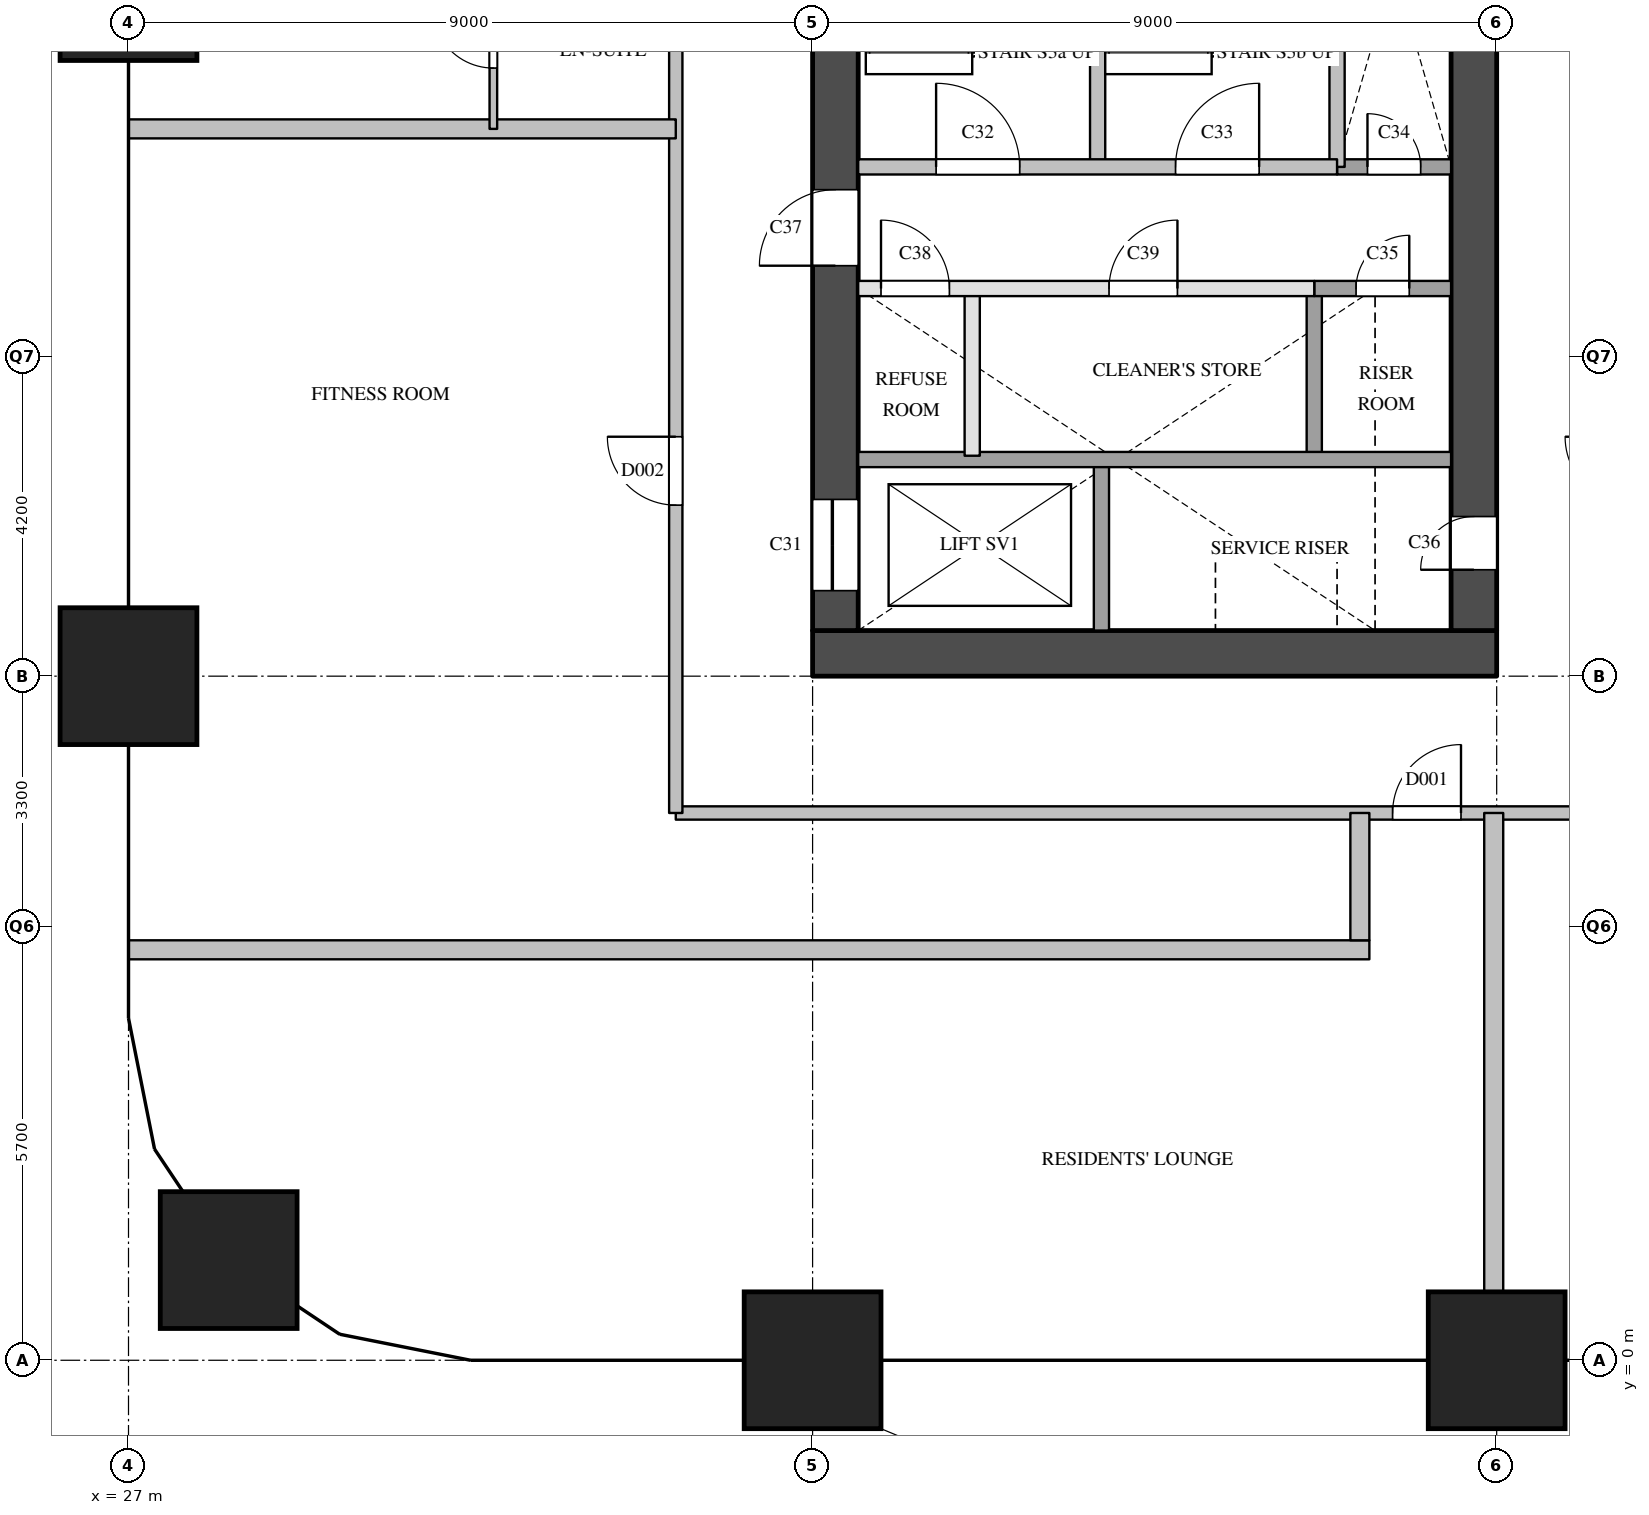
"""IFC4 building model, lengths in metres.
Left out: names, types, materials, properties, quantities, classifications, styles, units other than length and angle.
Written with IfcOpenShell. Run it as: python <this file> out.ifc"""

import sys

from ifc_helpers import new_model, si_unit, direction, frame, frame_2d, origin, origin_2d, place, context, subcontext, project, spatial, rectangle, extrude, element, fill, save


model = new_model("IFC4")
c1 = context("Model", 3, precision=1e-05, world=origin(), true_north=direction((0.0, 1.0)))
c2 = subcontext(c1, "Body", "Model", "MODEL_VIEW")
j1 = project(units=[si_unit("LENGTHUNIT", "METRE"), si_unit("PLANEANGLEUNIT", "RADIAN")], contexts=[c1])
p1 = place(None, origin())
s1 = spatial("IfcSite", under=j1, at=p1, CompositionType="ELEMENT")
p2 = place(p1, origin())
s2 = spatial("IfcBuilding", under=s1, at=p2, CompositionType="ELEMENT")
p3 = place(p2, frame((0.0, 0.0, 89.2)))
s3 = spatial("IfcBuildingStorey", under=s2, at=p3, CompositionType="ELEMENT", Elevation=89.2)
for number, where, z_axis, x_axis in (
    (1, (28.318, 1.318, 0.0), (0.0, 0.0, 1.0), (1.0, 0.0, 0.0)),
    (2, (27.0, 9.0, 0.0), (0.0, 0.0, 1.0), (1.0, 0.0, 0.0)),
    (3, (27.0, 18.0, 0.0), (0.0, 0.0, 1.0), (1.0, 0.0, 0.0)),
    (4, (36.0, 0.0, 0.0), (0.0, 0.0, 1.0), (1.0, 0.0, 0.0)),
    (5, (45.0, 0.0, 0.0), (0.0, 0.0, 1.0), (1.0, 0.0, 0.0)),
):
    element("IfcColumn", number, at=place(p3, frame(where, z_axis=z_axis, x_axis=x_axis)), inside=s3, PredefinedType="COLUMN", context=c2, shape_type="SweptSolid", body=[
        extrude(rectangle(XDim=1.8, YDim=1.8, at=origin_2d()), origin(), (0.0, 0.0, 1.0), 3.8),
    ])
p4 = place(p3, frame((36.0, 9.3, 0.0), z_axis=(0.0, 0.0, 1.0), x_axis=(1.0, 0.0, 0.0)))
e6 = element("IfcWall", 6, at=p4, inside=s3, PredefinedType="SHEAR", context=c2, shape_type="SweptSolid", body=[
    extrude(rectangle(XDim=9.0, YDim=0.6, at=frame_2d((4.5, 0.0))), origin(), (0.0, 0.0, 1.0), 3.5),
])
p5 = place(p3, frame((36.3, 9.6, 0.0), z_axis=(0.0, 0.0, 1.0), x_axis=(0.0, 1.0, 0.0)))
e7 = element("IfcWall", 7, at=p5, inside=s3, PredefinedType="SHEAR", context=c2, shape_type="SweptSolid", body=[
    extrude(rectangle(XDim=12.3, YDim=0.6, at=frame_2d((6.15, 0.0))), origin(), (0.0, 0.0, 1.0), 3.5),
])
p6 = place(p5, frame((0.525, 0.0, 0.0)))
e8 = element("IfcOpeningElement", 8, at=p6, cuts=e7, PredefinedType="OPENING", context=c2, shape_type="SweptSolid", body=[
    extrude(rectangle(XDim=1.2, YDim=2.1, at=frame_2d((0.6, 1.05))), frame((0.0, 0.31, 0.0), z_axis=(0.0, -1.0, 0.0), x_axis=(1.0, 0.0, 0.0)), (0.0, 0.0, 1.0), 0.62),
])
p7 = place(p5, frame((4.8, 0.0, 0.0)))
e9 = element("IfcOpeningElement", 9, at=p7, cuts=e7, PredefinedType="OPENING", context=c2, shape_type="SweptSolid", body=[
    extrude(rectangle(XDim=1.0, YDim=2.1, at=frame_2d((0.5, 1.05))), frame((0.0, 0.31, 0.0), z_axis=(0.0, -1.0, 0.0), x_axis=(1.0, 0.0, 0.0)), (0.0, 0.0, 1.0), 0.62),
])
p8 = place(p3, frame((44.7, 9.6, 0.0), z_axis=(0.0, 0.0, 1.0), x_axis=(0.0, 1.0, 0.0)))
e10 = element("IfcWall", 10, at=p8, inside=s3, PredefinedType="SHEAR", context=c2, shape_type="SweptSolid", body=[
    extrude(rectangle(XDim=12.3, YDim=0.6, at=frame_2d((6.15, 0.0))), origin(), (0.0, 0.0, 1.0), 3.5),
])
p9 = place(p8, frame((0.8, 0.0, 0.0)))
e11 = element("IfcOpeningElement", 11, at=p9, cuts=e10, PredefinedType="OPENING", context=c2, shape_type="SweptSolid", body=[
    extrude(rectangle(XDim=0.7, YDim=2.1, at=frame_2d((0.35, 1.05))), frame((0.0, 0.31, 0.0), z_axis=(0.0, -1.0, 0.0), x_axis=(1.0, 0.0, 0.0)), (0.0, 0.0, 1.0), 0.62),
])
p10 = place(p3, frame((38.1, 11.9, 0.0), z_axis=(0.0, 0.0, 1.0), x_axis=(0.0, 1.0, 0.0)))
e12 = element("IfcWall", 12, at=p10, inside=s3, PredefinedType="PARTITIONING", context=c2, shape_type="SweptSolid", body=[
    extrude(rectangle(XDim=2.2, YDim=0.2, at=frame_2d((1.1, 0.0))), origin(), (0.0, 0.0, 1.0), 3.5),
])
p11 = place(p3, frame((39.75, 15.7, 0.0), z_axis=(0.0, 0.0, 1.0), x_axis=(0.0, 1.0, 0.0)))
e13 = element("IfcWall", 13, at=p11, inside=s3, PredefinedType="SOLIDWALL", context=c2, shape_type="SweptSolid", body=[
    extrude(rectangle(XDim=4.3, YDim=0.2, at=frame_2d((2.15, 0.0))), origin(), (0.0, 0.0, 1.0), 3.5),
])
p12 = place(p3, frame((39.8, 9.6, 0.0), z_axis=(0.0, 0.0, 1.0), x_axis=(0.0, 1.0, 0.0)))
e14 = element("IfcWall", 14, at=p12, inside=s3, PredefinedType="SOLIDWALL", context=c2, shape_type="SweptSolid", body=[
    extrude(rectangle(XDim=2.3, YDim=0.2, at=frame_2d((1.15, 0.0))), origin(), (0.0, 0.0, 1.0), 3.5),
])
p13 = place(p3, frame((42.6, 11.9, 0.0), z_axis=(0.0, 0.0, 1.0), x_axis=(0.0, 1.0, 0.0)))
e15 = element("IfcWall", 15, at=p13, inside=s3, PredefinedType="SOLIDWALL", context=c2, shape_type="SweptSolid", body=[
    extrude(rectangle(XDim=2.2, YDim=0.2, at=frame_2d((1.1, 0.0))), origin(), (0.0, 0.0, 1.0), 3.5),
])
p14 = place(p3, frame((42.9, 15.7, 0.0), z_axis=(0.0, 0.0, 1.0), x_axis=(0.0, 1.0, 0.0)))
e16 = element("IfcWall", 16, at=p14, inside=s3, PredefinedType="SOLIDWALL", context=c2, shape_type="SweptSolid", body=[
    extrude(rectangle(XDim=4.3, YDim=0.2, at=frame_2d((2.15, 0.0))), origin(), (0.0, 0.0, 1.0), 3.5),
])
p15 = place(p3, frame((36.6, 11.85, 0.0), z_axis=(0.0, 0.0, 1.0), x_axis=(1.0, 0.0, 0.0)))
e17 = element("IfcWall", 17, at=p15, inside=s3, PredefinedType="SOLIDWALL", context=c2, shape_type="SweptSolid", body=[
    extrude(rectangle(XDim=7.8, YDim=0.2, at=frame_2d((3.9, 0.0))), origin(), (0.0, 0.0, 1.0), 3.5),
])
p16 = place(p3, frame((36.6, 14.1, 0.0), z_axis=(0.0, 0.0, 1.0), x_axis=(1.0, 0.0, 0.0)))
e18 = element("IfcWall", 18, at=p16, inside=s3, PredefinedType="PARTITIONING", context=c2, shape_type="SweptSolid", body=[
    extrude(rectangle(XDim=6.0, YDim=0.2, at=frame_2d((3.0, 0.0))), origin(), (0.0, 0.0, 1.0), 3.5),
])
p17 = place(p16, frame((0.3, 0.0, 0.0)))
e19 = element("IfcOpeningElement", 19, at=p17, cuts=e18, PredefinedType="OPENING", context=c2, shape_type="SweptSolid", body=[
    extrude(rectangle(XDim=0.9, YDim=2.1, at=frame_2d((0.45, 1.05))), frame((0.0, 0.11, 0.0), z_axis=(0.0, -1.0, 0.0), x_axis=(1.0, 0.0, 0.0)), (0.0, 0.0, 1.0), 0.22),
])
p18 = place(p16, frame((3.3, 0.0, 0.0)))
e20 = element("IfcOpeningElement", 20, at=p18, cuts=e18, PredefinedType="OPENING", context=c2, shape_type="SweptSolid", body=[
    extrude(rectangle(XDim=0.9, YDim=2.1, at=frame_2d((0.45, 1.05))), frame((0.0, 0.11, 0.0), z_axis=(0.0, -1.0, 0.0), x_axis=(1.0, 0.0, 0.0)), (0.0, 0.0, 1.0), 0.22),
])
p19 = place(p3, frame((42.6, 14.1, 0.0), z_axis=(0.0, 0.0, 1.0), x_axis=(1.0, 0.0, 0.0)))
e21 = element("IfcWall", 21, at=p19, inside=s3, PredefinedType="SOLIDWALL", context=c2, shape_type="SweptSolid", body=[
    extrude(rectangle(XDim=1.8, YDim=0.2, at=frame_2d((0.9, 0.0))), origin(), (0.0, 0.0, 1.0), 3.5),
])
p20 = place(p19, frame((0.55, 0.0, 0.0)))
e22 = element("IfcOpeningElement", 22, at=p20, cuts=e21, PredefinedType="OPENING", context=c2, shape_type="SweptSolid", body=[
    extrude(rectangle(XDim=0.7, YDim=2.1, at=frame_2d((0.35, 1.05))), frame((0.0, 0.11, 0.0), z_axis=(0.0, -1.0, 0.0), x_axis=(1.0, 0.0, 0.0)), (0.0, 0.0, 1.0), 0.22),
])
p21 = place(p3, frame((42.9, 15.7, 0.0), z_axis=(0.0, 0.0, 1.0), x_axis=(1.0, 0.0, 0.0)))
e23 = element("IfcWall", 23, at=p21, inside=s3, PredefinedType="SOLIDWALL", context=c2, shape_type="SweptSolid", body=[
    extrude(rectangle(XDim=1.5, YDim=0.2, at=frame_2d((0.75, 0.0))), origin(), (0.0, 0.0, 1.0), 3.5),
])
p22 = place(p21, frame((0.4, 0.0, 0.0)))
e24 = element("IfcOpeningElement", 24, at=p22, cuts=e23, PredefinedType="OPENING", context=c2, shape_type="SweptSolid", body=[
    extrude(rectangle(XDim=0.7, YDim=2.1, at=frame_2d((0.35, 1.05))), frame((0.0, 0.11, 0.0), z_axis=(0.0, -1.0, 0.0), x_axis=(1.0, 0.0, 0.0)), (0.0, 0.0, 1.0), 0.22),
])
p23 = place(p3, frame((36.6, 15.7, 0.0), z_axis=(0.0, 0.0, 1.0), x_axis=(1.0, 0.0, 0.0)))
e25 = element("IfcWall", 25, at=p23, inside=s3, PredefinedType="SOLIDWALL", context=c2, shape_type="SweptSolid", body=[
    extrude(rectangle(XDim=6.3, YDim=0.2, at=frame_2d((3.15, 0.0))), origin(), (0.0, 0.0, 1.0), 3.5),
])
p24 = place(p23, frame((1.025, 0.0, 0.0)))
e26 = element("IfcOpeningElement", 26, at=p24, cuts=e25, PredefinedType="OPENING", context=c2, shape_type="SweptSolid", body=[
    extrude(rectangle(XDim=1.1, YDim=2.1, at=frame_2d((0.55, 1.05))), frame((0.0, 0.11, 0.0), z_axis=(0.0, -1.0, 0.0), x_axis=(1.0, 0.0, 0.0)), (0.0, 0.0, 1.0), 0.22),
])
p25 = place(p23, frame((4.175, 0.0, 0.0)))
e27 = element("IfcOpeningElement", 27, at=p25, cuts=e25, PredefinedType="OPENING", context=c2, shape_type="SweptSolid", body=[
    extrude(rectangle(XDim=1.1, YDim=2.1, at=frame_2d((0.55, 1.05))), frame((0.0, 0.11, 0.0), z_axis=(0.0, -1.0, 0.0), x_axis=(1.0, 0.0, 0.0)), (0.0, 0.0, 1.0), 0.22),
])
p26 = place(p3, frame((34.2, 7.2, 0.0), z_axis=(0.0, 0.0, 1.0), x_axis=(1.0, 0.0, 0.0)))
e28 = element("IfcWall", 28, at=p26, inside=s3, PredefinedType="PARTITIONING", context=c2, shape_type="SweptSolid", body=[
    extrude(rectangle(XDim=12.6, YDim=0.175, at=frame_2d((6.3, 0.0))), origin(), (0.0, 0.0, 1.0), 3.5),
])
p27 = place(p26, frame((9.43, 0.0, 0.0)))
e29 = element("IfcOpeningElement", 29, at=p27, cuts=e28, PredefinedType="OPENING", context=c2, shape_type="SweptSolid", body=[
    extrude(rectangle(XDim=0.9, YDim=2.1, at=frame_2d((0.45, 1.05))), frame((0.0, 0.097, 0.0), z_axis=(0.0, -1.0, 0.0), x_axis=(1.0, 0.0, 0.0)), (0.0, 0.0, 1.0), 0.195),
])
p28 = place(p3, frame((34.2, 7.2, 0.0), z_axis=(0.0, 0.0, 1.0), x_axis=(0.0, 1.0, 0.0)))
e30 = element("IfcWall", 30, at=p28, inside=s3, PredefinedType="PARTITIONING", context=c2, shape_type="SweptSolid", body=[
    extrude(rectangle(XDim=16.49, YDim=0.175, at=frame_2d((8.245, 0.0))), origin(), (0.0, 0.0, 1.0), 3.5),
])
p29 = place(p28, frame((4.05, 0.0, 0.0)))
e31 = element("IfcOpeningElement", 31, at=p29, cuts=e30, PredefinedType="OPENING", context=c2, shape_type="SweptSolid", body=[
    extrude(rectangle(XDim=0.9, YDim=2.1, at=frame_2d((0.45, 1.05))), frame((0.0, 0.097, 0.0), z_axis=(0.0, -1.0, 0.0), x_axis=(1.0, 0.0, 0.0)), (0.0, 0.0, 1.0), 0.195),
])
p30 = place(p28, frame((12.4, 0.0, 0.0)))
e32 = element("IfcOpeningElement", 32, at=p30, cuts=e30, PredefinedType="OPENING", context=c2, shape_type="SweptSolid", body=[
    extrude(rectangle(XDim=1.0, YDim=2.1, at=frame_2d((0.5, 1.05))), frame((0.0, 0.097, 0.0), z_axis=(0.0, -1.0, 0.0), x_axis=(1.0, 0.0, 0.0)), (0.0, 0.0, 1.0), 0.195),
])
p31 = place(p3, frame((27.0, 5.4, 0.0), z_axis=(0.0, 0.0, 1.0), x_axis=(1.0, 0.0, 0.0)))
e33 = element("IfcWall", 33, at=p31, inside=s3, PredefinedType="PARTITIONING", context=c2, shape_type="SweptSolid", body=[
    extrude(rectangle(XDim=16.325, YDim=0.25, at=frame_2d((8.163, 0.0))), origin(), (0.0, 0.0, 1.0), 2.5),
])
p32 = place(p3, frame((27.0, 16.2, 0.0), z_axis=(0.0, 0.0, 1.0), x_axis=(1.0, 0.0, 0.0)))
e34 = element("IfcWall", 34, at=p32, inside=s3, PredefinedType="PARTITIONING", context=c2, shape_type="SweptSolid", body=[
    extrude(rectangle(XDim=7.2, YDim=0.25, at=frame_2d((3.6, 0.0))), origin(), (0.0, 0.0, 1.0), 2.5),
])
p33 = place(p3, frame((43.2, 5.525, 0.0), z_axis=(0.0, 0.0, 1.0), x_axis=(0.0, 1.0, 0.0)))
e35 = element("IfcWall", 35, at=p33, inside=s3, PredefinedType="PARTITIONING", context=c2, shape_type="SweptSolid", body=[
    extrude(rectangle(XDim=1.675, YDim=0.25, at=frame_2d((0.837, 0.0))), origin(), (0.0, 0.0, 1.0), 3.5),
])
p34 = place(p3, frame((44.961, 0.0, 0.0), z_axis=(0.0, 0.0, 1.0), x_axis=(0.0, 1.0, 0.0)))
e36 = element("IfcWall", 36, at=p34, inside=s3, PredefinedType="PARTITIONING", context=c2, shape_type="SweptSolid", body=[
    extrude(rectangle(XDim=7.2, YDim=0.25, at=frame_2d((3.6, 0.0))), origin(), (0.0, 0.0, 1.0), 3.5),
])
p35 = place(p3, frame((31.8, 16.2, 0.0), z_axis=(0.0, 0.0, 1.0), x_axis=(0.0, 1.0, 0.0)))
e37 = element("IfcWall", 37, at=p35, inside=s3, PredefinedType="PARTITIONING", context=c2, shape_type="SweptSolid", body=[
    extrude(rectangle(XDim=2.4, YDim=0.1, at=frame_2d((1.2, 0.0))), origin(), (0.0, 0.0, 1.0), 3.5),
])
p36 = place(p35, frame((0.8, 0.0, 0.0)))
e38 = element("IfcOpeningElement", 38, at=p36, cuts=e37, PredefinedType="OPENING", context=c2, shape_type="SweptSolid", body=[
    extrude(rectangle(XDim=0.8, YDim=2.1, at=frame_2d((0.4, 1.05))), frame((0.0, 0.06, 0.0), z_axis=(0.0, -1.0, 0.0), x_axis=(1.0, 0.0, 0.0)), (0.0, 0.0, 1.0), 0.12),
])
p37 = place(p6, origin())
e39 = element("IfcDoor", 39, at=p37, inside=s3, OperationType="SLIDING_TO_LEFT", PredefinedType="DOOR", context=c2, shape_type="SweptSolid", body=[
    extrude(rectangle(XDim=1.2, YDim=2.1, at=frame_2d((0.6, 1.05))), frame((0.0, 0.025, 0.0), z_axis=(0.0, -1.0, 0.0), x_axis=(1.0, 0.0, 0.0)), (0.0, 0.0, 1.0), 0.05),
])
fill(e8, e39)
p38 = place(p24, origin())
e40 = element("IfcDoor", 40, at=p38, inside=s3, OperationType="SINGLE_SWING_LEFT", PredefinedType="DOOR", context=c2, shape_type="SweptSolid", body=[
    extrude(rectangle(XDim=1.1, YDim=2.1, at=frame_2d((0.55, 1.05))), frame((0.0, 0.025, 0.0), z_axis=(0.0, -1.0, 0.0), x_axis=(1.0, 0.0, 0.0)), (0.0, 0.0, 1.0), 0.05),
])
fill(e26, e40)
p39 = place(p25, origin())
e41 = element("IfcDoor", 41, at=p39, inside=s3, OperationType="SINGLE_SWING_RIGHT", PredefinedType="DOOR", context=c2, shape_type="SweptSolid", body=[
    extrude(rectangle(XDim=1.1, YDim=2.1, at=frame_2d((0.55, 1.05))), frame((0.0, 0.025, 0.0), z_axis=(0.0, -1.0, 0.0), x_axis=(1.0, 0.0, 0.0)), (0.0, 0.0, 1.0), 0.05),
])
fill(e27, e41)
p40 = place(p22, origin())
e42 = element("IfcDoor", 42, at=p40, inside=s3, OperationType="SINGLE_SWING_LEFT", PredefinedType="DOOR", context=c2, shape_type="SweptSolid", body=[
    extrude(rectangle(XDim=0.7, YDim=2.1, at=frame_2d((0.35, 1.05))), frame((0.0, 0.025, 0.0), z_axis=(0.0, -1.0, 0.0), x_axis=(1.0, 0.0, 0.0)), (0.0, 0.0, 1.0), 0.05),
])
fill(e24, e42)
p41 = place(p20, origin())
e43 = element("IfcDoor", 43, at=p41, inside=s3, OperationType="SINGLE_SWING_RIGHT", PredefinedType="DOOR", context=c2, shape_type="SweptSolid", body=[
    extrude(rectangle(XDim=0.7, YDim=2.1, at=frame_2d((0.35, 1.05))), frame((0.0, 0.025, 0.0), z_axis=(0.0, -1.0, 0.0), x_axis=(1.0, 0.0, 0.0)), (0.0, 0.0, 1.0), 0.05),
])
fill(e22, e43)
p42 = place(p9, origin())
e44 = element("IfcDoor", 44, at=p42, inside=s3, OperationType="SINGLE_SWING_LEFT", PredefinedType="DOOR", context=c2, shape_type="SweptSolid", body=[
    extrude(rectangle(XDim=0.7, YDim=2.1, at=frame_2d((0.35, 1.05))), frame((0.0, 0.025, 0.0), z_axis=(0.0, -1.0, 0.0), x_axis=(1.0, 0.0, 0.0)), (0.0, 0.0, 1.0), 0.05),
])
fill(e11, e44)
p43 = place(p7, origin())
e45 = element("IfcDoor", 45, at=p43, inside=s3, OperationType="SINGLE_SWING_LEFT", PredefinedType="DOOR", context=c2, shape_type="SweptSolid", body=[
    extrude(rectangle(XDim=1.0, YDim=2.1, at=frame_2d((0.5, 1.05))), frame((0.0, 0.025, 0.0), z_axis=(0.0, -1.0, 0.0), x_axis=(1.0, 0.0, 0.0)), (0.0, 0.0, 1.0), 0.05),
])
fill(e9, e45)
p44 = place(p17, origin())
e46 = element("IfcDoor", 46, at=p44, inside=s3, OperationType="SINGLE_SWING_LEFT", PredefinedType="DOOR", context=c2, shape_type="SweptSolid", body=[
    extrude(rectangle(XDim=0.9, YDim=2.1, at=frame_2d((0.45, 1.05))), frame((0.0, 0.025, 0.0), z_axis=(0.0, -1.0, 0.0), x_axis=(1.0, 0.0, 0.0)), (0.0, 0.0, 1.0), 0.05),
])
fill(e19, e46)
p45 = place(p18, origin())
e47 = element("IfcDoor", 47, at=p45, inside=s3, OperationType="SINGLE_SWING_RIGHT", PredefinedType="DOOR", context=c2, shape_type="SweptSolid", body=[
    extrude(rectangle(XDim=0.9, YDim=2.1, at=frame_2d((0.45, 1.05))), frame((0.0, 0.025, 0.0), z_axis=(0.0, -1.0, 0.0), x_axis=(1.0, 0.0, 0.0)), (0.0, 0.0, 1.0), 0.05),
])
fill(e20, e47)
p46 = place(p27, origin())
e48 = element("IfcDoor", 48, at=p46, inside=s3, OperationType="SINGLE_SWING_RIGHT", PredefinedType="DOOR", context=c2, shape_type="SweptSolid", body=[
    extrude(rectangle(XDim=0.9, YDim=2.1, at=frame_2d((0.45, 1.05))), frame((0.0, 0.025, 0.0), z_axis=(0.0, -1.0, 0.0), x_axis=(1.0, 0.0, 0.0)), (0.0, 0.0, 1.0), 0.05),
])
fill(e29, e48)
p47 = place(p29, origin())
e49 = element("IfcDoor", 49, at=p47, inside=s3, OperationType="SINGLE_SWING_RIGHT", PredefinedType="DOOR", context=c2, shape_type="SweptSolid", body=[
    extrude(rectangle(XDim=0.9, YDim=2.1, at=frame_2d((0.45, 1.05))), frame((0.0, 0.025, 0.0), z_axis=(0.0, -1.0, 0.0), x_axis=(1.0, 0.0, 0.0)), (0.0, 0.0, 1.0), 0.05),
])
fill(e31, e49)
p48 = place(p36, origin())
e50 = element("IfcDoor", 50, at=p48, inside=s3, OperationType="SINGLE_SWING_RIGHT", PredefinedType="DOOR", context=c2, shape_type="SweptSolid", body=[
    extrude(rectangle(XDim=0.8, YDim=2.1, at=frame_2d((0.4, 1.05))), frame((0.0, 0.025, 0.0), z_axis=(0.0, -1.0, 0.0), x_axis=(1.0, 0.0, 0.0)), (0.0, 0.0, 1.0), 0.05),
])
fill(e38, e50)
save(model, sys.argv[1])
